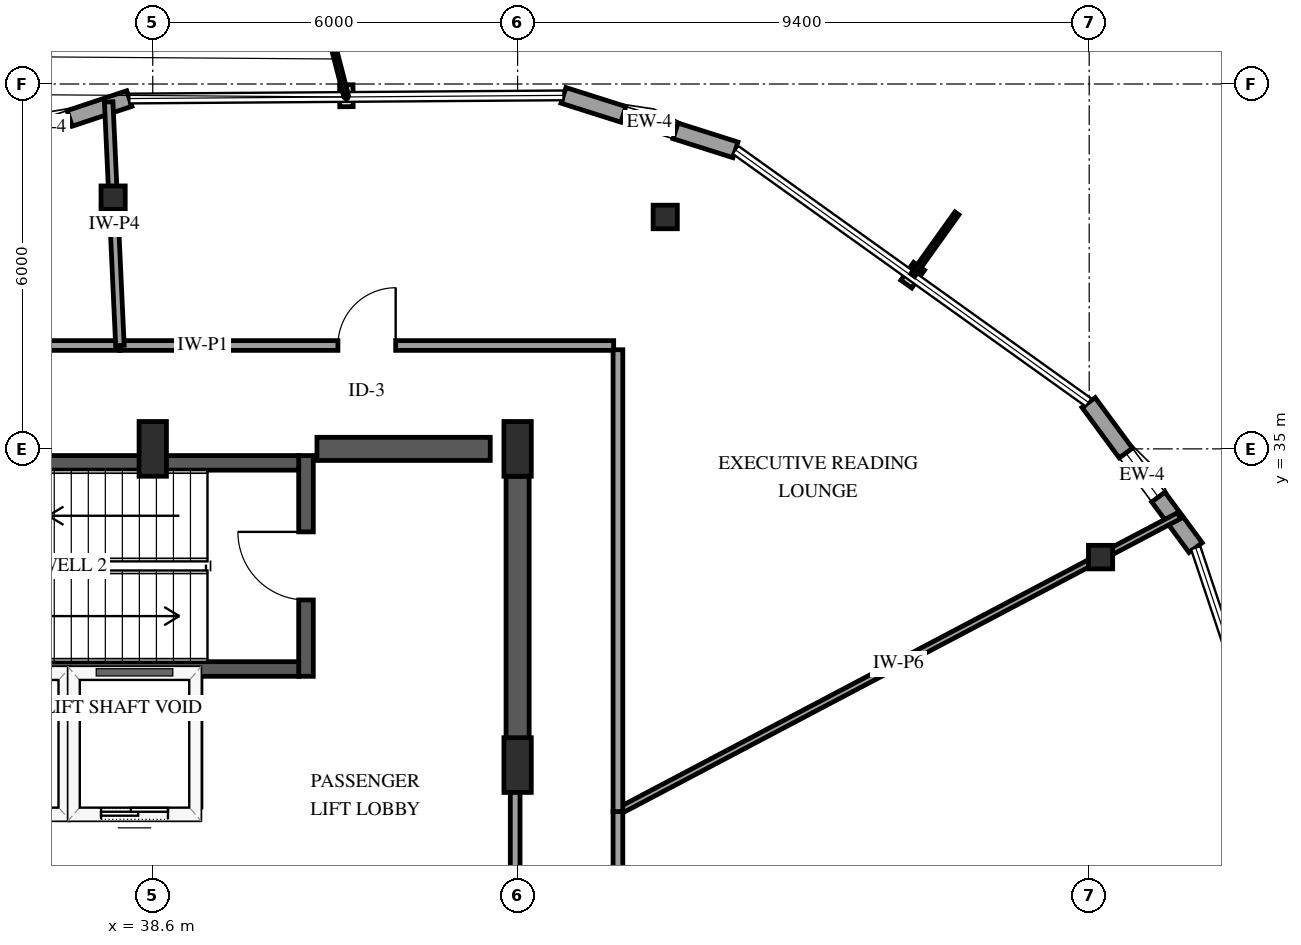
"""IFC4 building model, lengths in metres.
Left out: names, types, materials, properties, quantities, classifications, styles, units other than length and angle.
Written with IfcOpenShell. Run it as: python <this file> out.ifc"""

import sys

from ifc_helpers import new_model, si_unit, direction, frame, frame_2d, origin, origin_2d, place, context, subcontext, project, spatial, rectangle, i_section, extrude, element, fill, save


model = new_model("IFC4")
c1 = context("Model", 3, precision=1e-05, world=origin(), true_north=direction((0.0, 1.0)))
c2 = subcontext(c1, "Body", "Model", "MODEL_VIEW")
j1 = project(units=[si_unit("LENGTHUNIT", "METRE"), si_unit("PLANEANGLEUNIT", "RADIAN")], contexts=[c1])
p1 = place(None, origin())
s1 = spatial("IfcSite", under=j1, at=p1, CompositionType="ELEMENT")
p2 = place(p1, origin())
s2 = spatial("IfcBuilding", under=s1, at=p2, CompositionType="ELEMENT")
p3 = place(p2, frame((0.0, 0.0, 301.45)))
s3 = spatial("IfcBuildingStorey", under=s2, at=p3, CompositionType="ELEMENT", Elevation=301.45)
p4 = place(p3, frame((41.12, 31.26, 0.0), z_axis=(0.0, 0.0, 1.0), x_axis=(0.0, 1.0, 0.0)))
e1 = element("IfcWall", 1, at=p4, inside=s3, PredefinedType="SHEAR", context=c2, shape_type="SweptSolid", body=[
    extrude(rectangle(XDim=3.63, YDim=0.24, at=frame_2d((1.815, 0.0))), origin(), (0.0, 0.0, 1.0), 4.2),
])
p5 = place(p4, frame((1.255, 0.0, 0.0)))
e2 = element("IfcOpeningElement", 2, at=p5, cuts=e1, PredefinedType="OPENING", context=c2, shape_type="SweptSolid", body=[
    extrude(rectangle(XDim=1.12, YDim=2.15, at=frame_2d((0.56, 1.075))), frame((0.0, 0.13, 0.0), z_axis=(0.0, -1.0, 0.0), x_axis=(1.0, 0.0, 0.0)), (0.0, 0.0, 1.0), 0.26),
])
for number, where, z_axis, x_axis in (
    (3, (33.0, 31.38, 0.0), (0.0, 0.0, 1.0), (1.0, 0.0, 0.0)),
    (4, (33.0, 34.77, 0.0), (0.0, 0.0, 1.0), (1.0, 0.0, 0.0)),
):
    element("IfcWall", number, at=place(p3, frame(where, z_axis=z_axis, x_axis=x_axis)), inside=s3, PredefinedType="SHEAR", context=c2, shape_type="SweptSolid", body=[
        extrude(rectangle(XDim=8.0, YDim=0.24, at=frame_2d((4.0, 0.0))), origin(), (0.0, 0.0, 1.0), 4.2),
    ])
p6 = place(p3, frame((41.3, 35.0, 0.0), z_axis=(0.0, 0.0, 1.0), x_axis=(1.0, 0.0, 0.0)))
e5 = element("IfcWall", 5, at=p6, inside=s3, PredefinedType="SHEAR", context=c2, shape_type="SweptSolid", body=[
    extrude(rectangle(XDim=2.85, YDim=0.38, at=frame_2d((1.425, 0.0))), origin(), (0.0, 0.0, 1.0), 4.2),
])
p7 = place(p3, frame((44.6, 29.8, 0.0), z_axis=(0.0, 0.0, 1.0), x_axis=(0.0, 1.0, 0.0)))
e6 = element("IfcWall", 6, at=p7, inside=s3, PredefinedType="SHEAR", context=c2, shape_type="SweptSolid", body=[
    extrude(rectangle(XDim=4.75, YDim=0.38, at=frame_2d((2.375, 0.0))), origin(), (0.0, 0.0, 1.0), 4.2),
])
for number, where, z_axis, x_axis in (
    (7, (38.6, 35.0, 0.0), (0.0, 0.0, 1.0), (1.0, 0.0, 0.0)),
    (8, (44.6, 29.8, 0.0), (0.0, 0.0, 1.0), (1.0, 0.0, 0.0)),
    (9, (44.6, 35.0, 0.0), (0.0, 0.0, 1.0), (1.0, 0.0, 0.0)),
):
    element("IfcColumn", number, at=place(p3, frame(where, z_axis=z_axis, x_axis=x_axis)), inside=s3, PredefinedType="PILASTER", context=c2, shape_type="SweptSolid", body=[
        extrude(rectangle(XDim=0.45, YDim=0.9, at=origin_2d()), origin(), (0.0, 0.0, 1.0), 4.2),
    ])
for number, where, z_axis, x_axis in (
    (10, (54.187, 33.22, 0.0), (0.0, 0.0, 1.0), (1.0, 0.0, 0.0)),
    (11, (47.028, 38.813, 0.0), (0.0, 0.0, 1.0), (1.0, 0.0, 0.0)),
    (12, (37.948, 39.131, 0.0), (0.0, 0.0, 1.0), (1.0, 0.0, 0.0)),
):
    element("IfcColumn", number, at=place(p3, frame(where, z_axis=z_axis, x_axis=x_axis)), inside=s3, PredefinedType="COLUMN", context=c2, shape_type="SweptSolid", body=[
        extrude(i_section(OverallWidth=0.398, OverallDepth=0.387, WebThickness=0.021, FlangeThickness=0.033, FilletRadius=0.038, at=origin_2d()), origin(), (0.0, 0.0, 1.0), 4.2),
    ])
p8 = place(p3, frame((38.214, 40.761, 0.0), z_axis=(0.0, 0.0, 1.0), x_axis=(-0.948757335835, -0.31600556593, 0.0)))
e13 = element("IfcWall", 13, at=p8, inside=s3, PredefinedType="SOLIDWALL", context=c2, shape_type="SweptSolid", body=[
    extrude(rectangle(XDim=2.967, YDim=0.27, at=frame_2d((1.483, 0.0))), origin(), (0.0, 0.0, 1.0), 3.274),
])
p9 = place(p8, frame((1.033, 0.0, 0.75)))
e14 = element("IfcOpeningElement", 14, at=p9, cuts=e13, PredefinedType="OPENING", context=c2, shape_type="SweptSolid", body=[
    extrude(rectangle(XDim=0.9, YDim=1.5, at=frame_2d((0.45, 0.75))), frame((0.0, 0.145, 0.0), z_axis=(0.0, -1.0, 0.0), x_axis=(1.0, 0.0, 0.0)), (0.0, 0.0, 1.0), 0.29),
])
p10 = place(p3, frame((55.75, 33.376, 0.0), z_axis=(0.0, 0.0, 1.0), x_axis=(-0.593634095406, 0.804735087325, 0.0)))
e15 = element("IfcWall", 15, at=p10, inside=s3, PredefinedType="SOLIDWALL", context=c2, shape_type="SweptSolid", body=[
    extrude(rectangle(XDim=2.967, YDim=0.27, at=frame_2d((1.483, 0.0))), origin(), (0.0, 0.0, 1.0), 3.274),
])
p11 = place(p10, frame((1.033, 0.0, 0.75)))
e16 = element("IfcOpeningElement", 16, at=p11, cuts=e15, PredefinedType="OPENING", context=c2, shape_type="SweptSolid", body=[
    extrude(rectangle(XDim=0.9, YDim=1.5, at=frame_2d((0.45, 0.75))), frame((0.0, 0.145, 0.0), z_axis=(0.0, -1.0, 0.0), x_axis=(1.0, 0.0, 0.0)), (0.0, 0.0, 1.0), 0.29),
])
p12 = place(p3, frame((48.182, 39.917, 0.0), z_axis=(0.0, 0.0, 1.0), x_axis=(-0.953301162706, 0.302021345574, 0.0)))
e17 = element("IfcWall", 17, at=p12, inside=s3, PredefinedType="SOLIDWALL", context=c2, shape_type="SweptSolid", body=[
    extrude(rectangle(XDim=2.967, YDim=0.27, at=frame_2d((1.483, 0.0))), origin(), (0.0, 0.0, 1.0), 3.274),
])
p13 = place(p12, frame((1.033, 0.0, 0.75)))
e18 = element("IfcOpeningElement", 18, at=p13, cuts=e17, PredefinedType="OPENING", context=c2, shape_type="SweptSolid", body=[
    extrude(rectangle(XDim=0.9, YDim=1.5, at=frame_2d((0.45, 0.75))), frame((0.0, 0.145, 0.0), z_axis=(0.0, -1.0, 0.0), x_axis=(1.0, 0.0, 0.0)), (0.0, 0.0, 1.0), 0.29),
])
p14 = place(p3, frame((35.15, 29.0, 0.0), z_axis=(0.0, 0.0, 1.0), x_axis=(1.0, 0.0, 0.0)))
e19 = element("IfcWall", 19, at=p14, inside=s3, PredefinedType="SOLIDWALL", context=c2, shape_type="SweptSolid", body=[
    extrude(rectangle(XDim=2.0, YDim=0.185, at=frame_2d((1.0, 0.0))), origin(), (0.0, 0.0, 1.0), 3.895),
])
p15 = place(p14, frame((0.45, 0.0, 0.0)))
e20 = element("IfcOpeningElement", 20, at=p15, cuts=e19, PredefinedType="OPENING", context=c2, shape_type="SweptSolid", body=[
    extrude(rectangle(XDim=1.1, YDim=2.15, at=frame_2d((0.55, 1.075))), frame((0.0, 0.103, 0.0), z_axis=(0.0, -1.0, 0.0), x_axis=(1.0, 0.0, 0.0)), (0.0, 0.0, 1.0), 0.205),
])
p16 = place(p3, frame((37.15, 29.11, 0.0), z_axis=(0.0, 0.0, 1.0), x_axis=(0.0, 1.0, 0.0)))
e21 = element("IfcWall", 21, at=p16, inside=s3, PredefinedType="SOLIDWALL", context=c2, shape_type="SweptSolid", body=[
    extrude(rectangle(XDim=2.1, YDim=0.185, at=frame_2d((1.05, 0.0))), origin(), (0.0, 0.0, 1.0), 3.895),
])
p17 = place(p3, frame((37.3, 29.0, 0.0), z_axis=(0.0, 0.0, 1.0), x_axis=(1.0, 0.0, 0.0)))
e22 = element("IfcWall", 22, at=p17, inside=s3, PredefinedType="SOLIDWALL", context=c2, shape_type="SweptSolid", body=[
    extrude(rectangle(XDim=2.0, YDim=0.185, at=frame_2d((1.0, 0.0))), origin(), (0.0, 0.0, 1.0), 3.895),
])
p18 = place(p17, frame((0.45, 0.0, 0.0)))
e23 = element("IfcOpeningElement", 23, at=p18, cuts=e22, PredefinedType="OPENING", context=c2, shape_type="SweptSolid", body=[
    extrude(rectangle(XDim=1.1, YDim=2.15, at=frame_2d((0.55, 1.075))), frame((0.0, 0.103, 0.0), z_axis=(0.0, -1.0, 0.0), x_axis=(1.0, 0.0, 0.0)), (0.0, 0.0, 1.0), 0.205),
])
p19 = place(p3, frame((39.3, 29.11, 0.0), z_axis=(0.0, 0.0, 1.0), x_axis=(0.0, 1.0, 0.0)))
e24 = element("IfcWall", 24, at=p19, inside=s3, PredefinedType="SOLIDWALL", context=c2, shape_type="SweptSolid", body=[
    extrude(rectangle(XDim=2.1, YDim=0.185, at=frame_2d((1.05, 0.0))), origin(), (0.0, 0.0, 1.0), 3.895),
])
p20 = place(p3, frame((55.478, 33.901, 0.0), z_axis=(0.0, 0.0, 1.0), x_axis=(-0.884558040769, -0.466430136795, 0.0)))
e25 = element("IfcWall", 25, at=p20, inside=s3, PredefinedType="PARTITIONING", context=c2, shape_type="SweptSolid", body=[
    extrude(rectangle(XDim=10.432, YDim=0.11, at=frame_2d((5.216, 0.0))), origin(), (0.0, 0.0, 1.0), 3.273),
])
p21 = place(p3, frame((46.25, 29.035, 0.0), z_axis=(0.0, 0.0, 1.0), x_axis=(0.0, -1.0, 0.0)))
e26 = element("IfcWall", 26, at=p21, inside=s3, PredefinedType="PARTITIONING", context=c2, shape_type="SweptSolid", body=[
    extrude(rectangle(XDim=8.656, YDim=0.16, at=frame_2d((4.328, 0.0))), origin(), (0.0, 0.0, 1.0), 3.895),
])
p22 = place(p21, frame((3.853, 0.0, 0.0)))
e27 = element("IfcOpeningElement", 27, at=p22, cuts=e26, PredefinedType="OPENING", context=c2, shape_type="SweptSolid", body=[
    extrude(rectangle(XDim=0.95, YDim=2.15, at=frame_2d((0.475, 1.075))), frame((0.0, 0.09, 0.0), z_axis=(0.0, -1.0, 0.0), x_axis=(1.0, 0.0, 0.0)), (0.0, 0.0, 1.0), 0.18),
])
p23 = place(p3, frame((38.06, 36.7, 0.0), z_axis=(0.0, 0.0, 1.0), x_axis=(1.0, 0.0, 0.0)))
e28 = element("IfcWall", 28, at=p23, inside=s3, PredefinedType="PARTITIONING", context=c2, shape_type="SweptSolid", body=[
    extrude(rectangle(XDim=8.12, YDim=0.16, at=frame_2d((4.06, 0.0))), origin(), (0.0, 0.0, 1.0), 3.895),
])
p24 = place(p23, frame((3.585, 0.0, 0.0)))
e29 = element("IfcOpeningElement", 29, at=p24, cuts=e28, PredefinedType="OPENING", context=c2, shape_type="SweptSolid", body=[
    extrude(rectangle(XDim=0.95, YDim=2.15, at=frame_2d((0.475, 1.075))), frame((0.0, 0.09, 0.0), z_axis=(0.0, -1.0, 0.0), x_axis=(1.0, 0.0, 0.0)), (0.0, 0.0, 1.0), 0.18),
])
p25 = place(p3, frame((46.25, 36.63, 0.0), z_axis=(0.0, 0.0, 1.0), x_axis=(0.0, -1.0, 0.0)))
e30 = element("IfcWall", 30, at=p25, inside=s3, PredefinedType="PARTITIONING", context=c2, shape_type="SweptSolid", body=[
    extrude(rectangle(XDim=7.595, YDim=0.16, at=frame_2d((3.797, 0.0))), origin(), (0.0, 0.0, 1.0), 3.895),
])
p26 = place(p3, frame((44.56, 29.8, 0.0), z_axis=(0.0, 0.0, 1.0), x_axis=(0.0, -1.0, 0.0)))
e31 = element("IfcWall", 31, at=p26, inside=s3, PredefinedType="PARTITIONING", context=c2, shape_type="SweptSolid", body=[
    extrude(rectangle(XDim=6.91, YDim=0.16, at=frame_2d((3.455, 0.0))), origin(), (0.0, 0.0, 1.0), 2.935),
])
p27 = place(p26, frame((2.915, 0.0, 0.0)))
e32 = element("IfcOpeningElement", 32, at=p27, cuts=e31, PredefinedType="OPENING", context=c2, shape_type="SweptSolid", body=[
    extrude(rectangle(XDim=1.08, YDim=2.15, at=frame_2d((0.54, 1.075))), frame((0.0, 0.09, 0.0), z_axis=(0.0, -1.0, 0.0), x_axis=(1.0, 0.0, 0.0)), (0.0, 0.0, 1.0), 0.18),
])
p28 = place(p3, frame((32.67, 36.7, 0.0), z_axis=(0.0, 0.0, 1.0), x_axis=(1.0, 0.0, 0.0)))
e33 = element("IfcWall", 33, at=p28, inside=s3, PredefinedType="PARTITIONING", context=c2, shape_type="SweptSolid", body=[
    extrude(rectangle(XDim=5.39, YDim=0.16, at=frame_2d((2.695, 0.0))), origin(), (0.0, 0.0, 1.0), 3.895),
])
p29 = place(p28, frame((2.22, 0.0, 0.0)))
e34 = element("IfcOpeningElement", 34, at=p29, cuts=e33, PredefinedType="OPENING", context=c2, shape_type="SweptSolid", body=[
    extrude(rectangle(XDim=0.95, YDim=2.15, at=frame_2d((0.475, 1.075))), frame((0.0, 0.09, 0.0), z_axis=(0.0, -1.0, 0.0), x_axis=(1.0, 0.0, 0.0)), (0.0, 0.0, 1.0), 0.18),
])
p30 = place(p3, frame((38.06, 36.7, 0.0), z_axis=(0.0, 0.0, 1.0), x_axis=(-0.046156181076, 0.998934235547, 0.0)))
e35 = element("IfcWall", 35, at=p30, inside=s3, PredefinedType="PARTITIONING", context=c2, shape_type="SweptSolid", body=[
    extrude(rectangle(XDim=4.01, YDim=0.14, at=frame_2d((2.005, 0.0))), origin(), (0.0, 0.0, 1.0), 3.19),
])
p31 = place(p9, origin())
e36 = element("IfcWindow", 36, at=p31, inside=s3, PartitioningType="SINGLE_PANEL", PredefinedType="WINDOW", context=c2, shape_type="SweptSolid", body=[
    extrude(rectangle(XDim=0.9, YDim=1.5, at=frame_2d((0.45, 0.75))), frame((0.0, 0.03, 0.0), z_axis=(0.0, -1.0, 0.0), x_axis=(1.0, 0.0, 0.0)), (0.0, 0.0, 1.0), 0.06),
])
fill(e14, e36)
p32 = place(p11, origin())
e37 = element("IfcWindow", 37, at=p32, inside=s3, PartitioningType="SINGLE_PANEL", PredefinedType="WINDOW", context=c2, shape_type="SweptSolid", body=[
    extrude(rectangle(XDim=0.9, YDim=1.5, at=frame_2d((0.45, 0.75))), frame((0.0, 0.03, 0.0), z_axis=(0.0, -1.0, 0.0), x_axis=(1.0, 0.0, 0.0)), (0.0, 0.0, 1.0), 0.06),
])
fill(e16, e37)
p33 = place(p13, origin())
e38 = element("IfcWindow", 38, at=p33, inside=s3, PartitioningType="SINGLE_PANEL", PredefinedType="WINDOW", context=c2, shape_type="SweptSolid", body=[
    extrude(rectangle(XDim=0.9, YDim=1.5, at=frame_2d((0.45, 0.75))), frame((0.0, 0.03, 0.0), z_axis=(0.0, -1.0, 0.0), x_axis=(1.0, 0.0, 0.0)), (0.0, 0.0, 1.0), 0.06),
])
fill(e18, e38)
p34 = place(p18, origin())
e39 = element("IfcDoor", 39, at=p34, inside=s3, OperationType="SLIDING_TO_LEFT", PredefinedType="DOOR", context=c2, shape_type="SweptSolid", body=[
    extrude(rectangle(XDim=1.1, YDim=2.15, at=frame_2d((0.55, 1.075))), frame((0.0, 0.025, 0.0), z_axis=(0.0, -1.0, 0.0), x_axis=(1.0, 0.0, 0.0)), (0.0, 0.0, 1.0), 0.05),
])
fill(e23, e39)
p35 = place(p5, origin())
e40 = element("IfcDoor", 40, at=p35, inside=s3, OperationType="SINGLE_SWING_RIGHT", PredefinedType="DOOR", context=c2, shape_type="SweptSolid", body=[
    extrude(rectangle(XDim=1.12, YDim=2.15, at=frame_2d((0.56, 1.075))), frame((0.0, 0.025, 0.0), z_axis=(0.0, -1.0, 0.0), x_axis=(1.0, 0.0, 0.0)), (0.0, 0.0, 1.0), 0.05),
])
fill(e2, e40)
p36 = place(p24, origin())
e41 = element("IfcDoor", 41, at=p36, inside=s3, OperationType="SINGLE_SWING_RIGHT", PredefinedType="DOOR", context=c2, shape_type="SweptSolid", body=[
    extrude(rectangle(XDim=0.95, YDim=2.15, at=frame_2d((0.475, 1.075))), frame((0.0, 0.025, 0.0), z_axis=(0.0, -1.0, 0.0), x_axis=(1.0, 0.0, 0.0)), (0.0, 0.0, 1.0), 0.05),
])
fill(e29, e41)
save(model, sys.argv[1])
